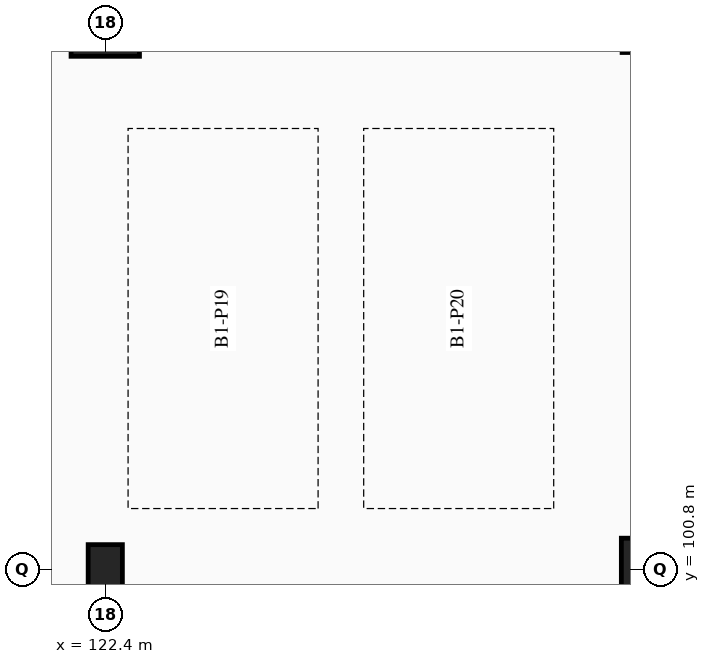
"""IFC4 building model, lengths in metres.
Left out: names, types, materials, properties, quantities, classifications, styles, units other than length and angle.
Written with IfcOpenShell. Run it as: python <this file> out.ifc"""

import sys

from ifc_helpers import new_model, si_unit, direction, frame, origin, origin_2d, place, context, subcontext, project, spatial, rectangle, extrude, element, save


model = new_model("IFC4")
c1 = context("Model", 3, precision=1e-05, world=origin(), true_north=direction((0.0, 1.0)))
c2 = subcontext(c1, "Body", "Model", "MODEL_VIEW")
j1 = project(units=[si_unit("LENGTHUNIT", "METRE"), si_unit("PLANEANGLEUNIT", "RADIAN")], contexts=[c1])
p1 = place(None, origin())
s1 = spatial("IfcSite", under=j1, at=p1, CompositionType="ELEMENT")
p2 = place(p1, origin())
s2 = spatial("IfcBuilding", under=s1, at=p2, CompositionType="ELEMENT")
p3 = place(p2, frame((0.0, 0.0, -4.5)))
s3 = spatial("IfcBuildingStorey", under=s2, at=p3, CompositionType="ELEMENT", Elevation=-4.5)
p4 = place(p3, frame((122.4, 100.8, -0.45), z_axis=(0.0, 0.0, 1.0), x_axis=(1.0, 0.0, 0.0)))
e1 = element("IfcColumn", 1, at=p4, inside=s3, PredefinedType="PILASTER", context=c2, shape_type="SweptSolid", body=[
    extrude(rectangle(XDim=0.45, YDim=0.65, at=origin_2d()), origin(), (0.0, 0.0, 1.0), 4.95),
])
p5 = place(p3, frame((122.4, 108.0, -0.45), z_axis=(0.0, 0.0, 1.0), x_axis=(1.0, 0.0, 0.0)))
e2 = element("IfcColumn", 2, at=p5, inside=s3, PredefinedType="COLUMN", context=c2, shape_type="SweptSolid", body=[
    extrude(rectangle(XDim=0.9, YDim=0.9, at=origin_2d()), origin(), (0.0, 0.0, 1.0), 4.95),
])
p6 = place(p3, frame((129.6, 100.8, -0.45), z_axis=(0.0, 0.0, 1.0), x_axis=(1.0, 0.0, 0.0)))
e3 = element("IfcColumn", 3, at=p6, inside=s3, PredefinedType="COLUMN", context=c2, shape_type="SweptSolid", body=[
    extrude(rectangle(XDim=0.82, YDim=0.82, at=origin_2d()), origin(), (0.0, 0.0, 1.0), 4.95),
])
p7 = place(p3, frame((129.6, 108.0, -0.45), z_axis=(0.0, 0.0, 1.0), x_axis=(1.0, 0.0, 0.0)))
e4 = element("IfcColumn", 4, at=p7, inside=s3, PredefinedType="COLUMN", context=c2, shape_type="SweptSolid", body=[
    extrude(rectangle(XDim=0.8, YDim=0.8, at=origin_2d()), origin(), (0.0, 0.0, 1.0), 4.95),
])
save(model, sys.argv[1])
